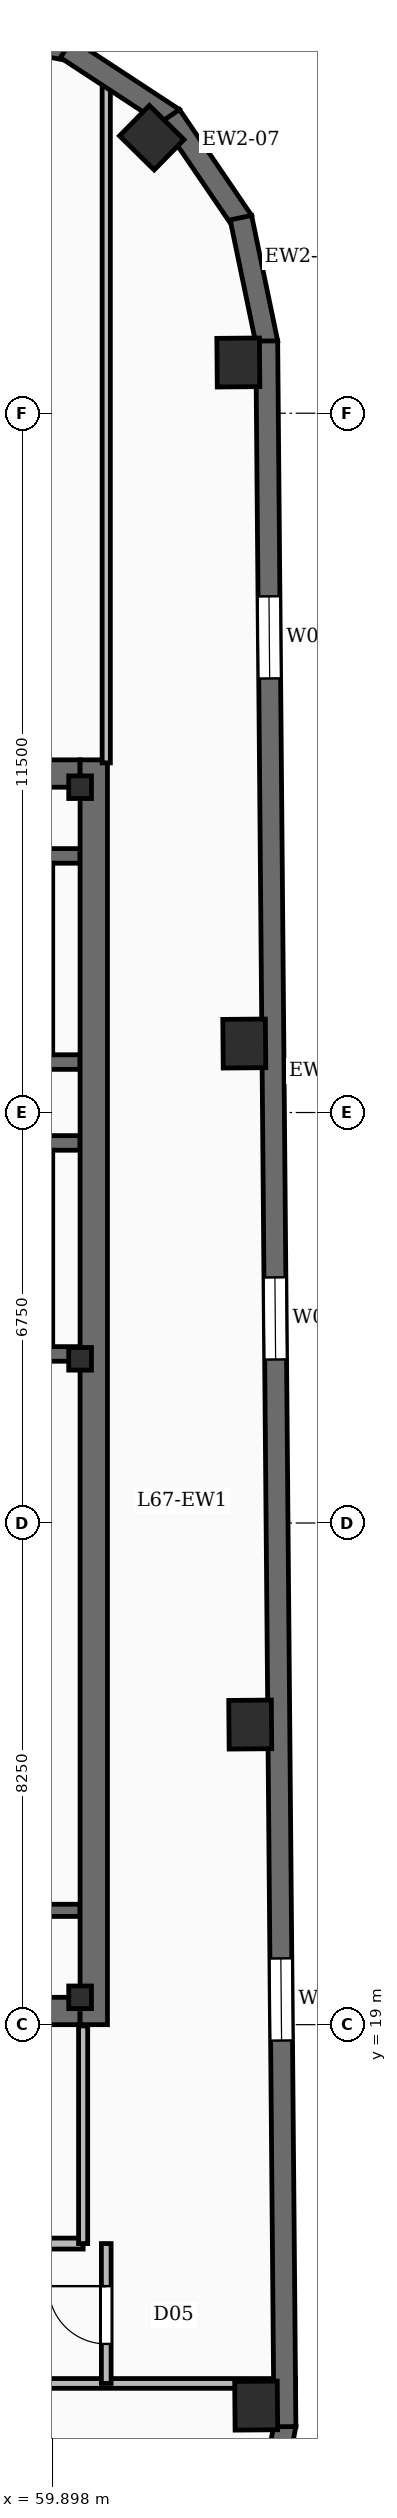
"""IFC4 building model, lengths in metres.
Left out: names, types, materials, properties, quantities, classifications, styles, units other than length and angle.
Written with IfcOpenShell. Run it as: python <this file> out.ifc"""

import sys

from ifc_helpers import new_model, si_unit, direction, frame, frame_2d, origin, origin_2d, place, context, subcontext, project, spatial, rectangle, i_section, extrude, element, fill, save


model = new_model("IFC4")
c1 = context("Model", 3, precision=1e-05, world=origin(), true_north=direction((0.0, 1.0)))
c2 = subcontext(c1, "Body", "Model", "MODEL_VIEW")
j1 = project(units=[si_unit("LENGTHUNIT", "METRE"), si_unit("PLANEANGLEUNIT", "RADIAN")], contexts=[c1])
p1 = place(None, origin())
s1 = spatial("IfcSite", under=j1, at=p1, CompositionType="ELEMENT")
p2 = place(p1, origin())
s2 = spatial("IfcBuilding", under=s1, at=p2, CompositionType="ELEMENT")
p3 = place(p2, frame((0.0, 0.0, 274.9)))
s3 = spatial("IfcBuildingStorey", under=s2, at=p3, CompositionType="ELEMENT", Elevation=274.9)
p4 = place(p3, frame((60.575, 19.0, -0.45), z_axis=(0.0, 0.0, 1.0), x_axis=(0.0, 1.0, 0.0)))
e1 = element("IfcWall", 1, at=p4, inside=s3, PredefinedType="SHEAR", context=c2, shape_type="SweptSolid", body=[
    extrude(rectangle(XDim=20.8, YDim=0.45, at=frame_2d((10.4, 0.0))), origin(), (0.0, 0.0, 1.0), 3.93),
])
for number, where, z_axis, x_axis in (
    (2, (50.55, 19.225, -0.45), (0.0, 0.0, 1.0), (1.0, 0.0, 0.0)),
    (3, (50.55, 39.575, -0.45), (0.0, 0.0, 1.0), (1.0, 0.0, 0.0)),
):
    element("IfcWall", number, at=place(p3, frame(where, z_axis=z_axis, x_axis=x_axis)), inside=s3, PredefinedType="SHEAR", context=c2, shape_type="SweptSolid", body=[
        extrude(rectangle(XDim=9.8, YDim=0.45, at=frame_2d((4.9, 0.0))), origin(), (0.0, 0.0, 1.0), 3.93),
    ])
for number, where, z_axis, x_axis in (
    (4, (60.35, 19.45, -0.45), (0.0, 0.0, 1.0), (1.0, 0.0, 0.0)),
    (5, (60.35, 29.95, -0.45), (0.0, 0.0, 1.0), (1.0, 0.0, 0.0)),
    (6, (60.35, 39.35, -0.45), (0.0, 0.0, 1.0), (1.0, 0.0, 0.0)),
):
    element("IfcColumn", number, at=place(p3, frame(where, z_axis=z_axis, x_axis=x_axis)), inside=s3, PredefinedType="COLUMN", context=c2, shape_type="SweptSolid", body=[
        extrude(i_section(OverallWidth=0.374, OverallDepth=0.372, WebThickness=0.016, FlangeThickness=0.026, FilletRadius=0.02, at=origin_2d()), origin(), (0.0, 0.0, 1.0), 3.93),
    ])
for number, where, z_axis, x_axis in (
    (7, (63.246, 12.735, -0.45), (0.0, 0.0, 1.0), (-0.009, 1.0, 0.0)),
    (8, (63.148, 23.935, -0.45), (0.0, 0.0, 1.0), (-0.009, 1.0, 0.0)),
    (9, (63.05, 35.135, -0.45), (0.0, 0.0, 1.0), (-0.009, 1.0, 0.0)),
    (10, (62.952, 46.334, -0.45), (0.0, 0.0, 1.0), (-0.009, 1.0, 0.0)),
    (11, (61.529, 50.031, -0.45), (0.0, 0.0, 1.0), (-0.713, 0.701, 0.0)),
):
    element("IfcColumn", number, at=place(p3, frame(where, z_axis=z_axis, x_axis=x_axis)), inside=s3, PredefinedType="COLUMN", context=c2, shape_type="SweptSolid", body=[
        extrude(rectangle(XDim=0.8, YDim=0.7, at=origin_2d()), origin(), (0.0, 0.0, 1.0), 3.93),
    ])
p5 = place(p3, frame((63.722, 12.425, 0.0), z_axis=(0.0, 0.0, 1.0), x_axis=(-0.186435855703, -0.98246713518, 0.0)))
e12 = element("IfcWall", 12, at=p5, inside=s3, PredefinedType="SOLIDWALL", context=c2, shape_type="SweptSolid", body=[
    extrude(rectangle(XDim=2.107, YDim=0.36, at=frame_2d((1.053, 0.0))), origin(), (0.0, 0.0, 1.0), 3.48),
])
p6 = place(p3, frame((63.419, 46.688, 0.0), z_axis=(0.0, 0.0, 1.0), x_axis=(0.008726391715, -0.999961924319, 0.0)))
e13 = element("IfcWall", 13, at=p6, inside=s3, PredefinedType="SOLIDWALL", context=c2, shape_type="SweptSolid", body=[
    extrude(rectangle(XDim=34.3, YDim=0.36, at=frame_2d((17.15, 0.0))), origin(), (0.0, 0.0, 1.0), 3.48),
])
p7 = place(p6, frame((4.2, 0.0, 0.88)))
e14 = element("IfcOpeningElement", 14, at=p7, cuts=e13, PredefinedType="OPENING", context=c2, shape_type="SweptSolid", body=[
    extrude(rectangle(XDim=1.35, YDim=2.2, at=frame_2d((0.675, 1.1))), frame((0.0, 0.19, 0.0), z_axis=(0.0, -1.0, 0.0), x_axis=(1.0, 0.0, 0.0)), (0.0, 0.0, 1.0), 0.38),
])
p8 = place(p6, frame((15.4, 0.0, 0.88)))
e15 = element("IfcOpeningElement", 15, at=p8, cuts=e13, PredefinedType="OPENING", context=c2, shape_type="SweptSolid", body=[
    extrude(rectangle(XDim=1.35, YDim=2.2, at=frame_2d((0.675, 1.1))), frame((0.0, 0.19, 0.0), z_axis=(0.0, -1.0, 0.0), x_axis=(1.0, 0.0, 0.0)), (0.0, 0.0, 1.0), 0.38),
])
p9 = place(p6, frame((26.6, 0.0, 0.88)))
e16 = element("IfcOpeningElement", 16, at=p9, cuts=e13, PredefinedType="OPENING", context=c2, shape_type="SweptSolid", body=[
    extrude(rectangle(XDim=1.35, YDim=2.2, at=frame_2d((0.675, 1.1))), frame((0.0, 0.19, 0.0), z_axis=(0.0, -1.0, 0.0), x_axis=(1.0, 0.0, 0.0)), (0.0, 0.0, 1.0), 0.38),
])
for number, where, z_axis, x_axis in (
    (17, (62.994, 48.716, 0.0), (0.0, 0.0, 1.0), (0.204, -0.979, 0.0)),
    (18, (61.836, 50.393, 0.0), (0.0, 0.0, 1.0), (0.563, -0.827, 0.0)),
):
    element("IfcWall", number, at=place(p3, frame(where, z_axis=z_axis, x_axis=x_axis)), inside=s3, PredefinedType="SOLIDWALL", context=c2, shape_type="SweptSolid", body=[
        extrude(rectangle(XDim=2.107, YDim=0.36, at=frame_2d((1.053, 0.0))), origin(), (0.0, 0.0, 1.0), 3.48),
    ])
for number, where, z_axis, x_axis in (
    (19, (60.124, 51.499, 0.0), (0.0, 0.0, 1.0), (0.836, -0.548, 0.0)),
    (20, (58.119, 51.865, 0.0), (0.0, 0.0, 1.0), (0.982, -0.186, 0.0)),
):
    element("IfcWall", number, at=place(p3, frame(where, z_axis=z_axis, x_axis=x_axis)), inside=s3, PredefinedType="SOLIDWALL", context=c2, shape_type="SweptSolid", body=[
        extrude(rectangle(XDim=2.107, YDim=0.36, at=frame_2d((1.053, 0.0))), origin(), (0.0, 0.0, 1.0), 3.48),
    ])
p10 = place(p3, frame((60.35, 30.03, 0.0), z_axis=(0.0, 0.0, 1.0), x_axis=(-1.0, 0.0, 0.0)))
e21 = element("IfcWall", 21, at=p10, inside=s3, PredefinedType="SOLIDWALL", context=c2, shape_type="SweptSolid", body=[
    extrude(rectangle(XDim=9.8, YDim=0.24, at=frame_2d((4.9, 0.0))), origin(), (0.0, 0.0, 1.0), 3.48),
])
p11 = place(p10, frame((7.83, 0.0, 0.0)))
e22 = element("IfcOpeningElement", 22, at=p11, cuts=e21, PredefinedType="OPENING", context=c2, shape_type="SweptSolid", body=[
    extrude(rectangle(XDim=1.1, YDim=2.15, at=frame_2d((0.55, 1.075))), frame((0.0, 0.13, 0.0), z_axis=(0.0, -1.0, 0.0), x_axis=(1.0, 0.0, 0.0)), (0.0, 0.0, 1.0), 0.26),
])
p12 = place(p3, frame((50.55, 33.5, 0.0), z_axis=(0.0, 0.0, 1.0), x_axis=(1.0, 0.0, 0.0)))
e23 = element("IfcWall", 23, at=p12, inside=s3, PredefinedType="SOLIDWALL", context=c2, shape_type="SweptSolid", body=[
    extrude(rectangle(XDim=9.8, YDim=0.24, at=frame_2d((4.9, 0.0))), origin(), (0.0, 0.0, 1.0), 3.48),
])
p13 = place(p3, frame((59.78, 30.15, 0.0), z_axis=(0.0, 0.0, 1.0), x_axis=(0.0, 1.0, 0.0)))
e24 = element("IfcWall", 24, at=p13, inside=s3, PredefinedType="SOLIDWALL", context=c2, shape_type="SweptSolid", body=[
    extrude(rectangle(XDim=3.23, YDim=0.24, at=frame_2d((1.615, 0.0))), origin(), (0.0, 0.0, 1.0), 3.48),
])
p14 = place(p3, frame((60.35, 34.83, 0.0), z_axis=(0.0, 0.0, 1.0), x_axis=(-1.0, 0.0, 0.0)))
e25 = element("IfcWall", 25, at=p14, inside=s3, PredefinedType="SOLIDWALL", context=c2, shape_type="SweptSolid", body=[
    extrude(rectangle(XDim=9.8, YDim=0.24, at=frame_2d((4.9, 0.0))), origin(), (0.0, 0.0, 1.0), 3.48),
])
p15 = place(p14, frame((7.87, 0.0, 0.0)))
e26 = element("IfcOpeningElement", 26, at=p15, cuts=e25, PredefinedType="OPENING", context=c2, shape_type="SweptSolid", body=[
    extrude(rectangle(XDim=1.1, YDim=2.15, at=frame_2d((0.55, 1.075))), frame((0.0, 0.13, 0.0), z_axis=(0.0, -1.0, 0.0), x_axis=(1.0, 0.0, 0.0)), (0.0, 0.0, 1.0), 0.26),
])
p16 = place(p3, frame((50.55, 38.22, 0.0), z_axis=(0.0, 0.0, 1.0), x_axis=(1.0, 0.0, 0.0)))
e27 = element("IfcWall", 27, at=p16, inside=s3, PredefinedType="SOLIDWALL", context=c2, shape_type="SweptSolid", body=[
    extrude(rectangle(XDim=9.8, YDim=0.24, at=frame_2d((4.9, 0.0))), origin(), (0.0, 0.0, 1.0), 3.48),
])
p17 = place(p3, frame((59.78, 34.95, 0.0), z_axis=(0.0, 0.0, 1.0), x_axis=(0.0, 1.0, 0.0)))
e28 = element("IfcWall", 28, at=p17, inside=s3, PredefinedType="SOLIDWALL", context=c2, shape_type="SweptSolid", body=[
    extrude(rectangle(XDim=3.15, YDim=0.24, at=frame_2d((1.575, 0.0))), origin(), (0.0, 0.0, 1.0), 3.48),
])
p18 = place(p3, frame((50.55, 20.88, 0.0), z_axis=(0.0, 0.0, 1.0), x_axis=(1.0, 0.0, 0.0)))
e29 = element("IfcWall", 29, at=p18, inside=s3, PredefinedType="SOLIDWALL", context=c2, shape_type="SweptSolid", body=[
    extrude(rectangle(XDim=9.8, YDim=0.2, at=frame_2d((4.9, 0.0))), origin(), (0.0, 0.0, 1.0), 2.54),
])
p19 = place(p18, frame((1.4, 0.0, 0.0)))
e30 = element("IfcOpeningElement", 30, at=p19, cuts=e29, PredefinedType="OPENING", context=c2, shape_type="SweptSolid", body=[
    extrude(rectangle(XDim=1.05, YDim=2.15, at=frame_2d((0.525, 1.075))), frame((0.0, 0.11, 0.0), z_axis=(0.0, -1.0, 0.0), x_axis=(1.0, 0.0, 0.0)), (0.0, 0.0, 1.0), 0.22),
])
p20 = place(p18, frame((5.5, 0.0, 0.0)))
e31 = element("IfcOpeningElement", 31, at=p20, cuts=e29, PredefinedType="OPENING", context=c2, shape_type="SweptSolid", body=[
    extrude(rectangle(XDim=1.05, YDim=2.15, at=frame_2d((0.525, 1.075))), frame((0.0, 0.11, 0.0), z_axis=(0.0, -1.0, 0.0), x_axis=(1.0, 0.0, 0.0)), (0.0, 0.0, 1.0), 0.22),
])
p21 = place(p3, frame((50.4, 15.4, 0.0), z_axis=(0.0, 0.0, 1.0), x_axis=(1.0, 0.0, 0.0)))
e32 = element("IfcWall", 32, at=p21, inside=s3, PredefinedType="SOLIDWALL", context=c2, shape_type="SweptSolid", body=[
    extrude(rectangle(XDim=10.0, YDim=0.18, at=frame_2d((5.0, 0.0))), origin(), (0.0, 0.0, 1.0), 2.54),
])
p22 = place(p21, frame((1.19, 0.0, 0.0)))
e33 = element("IfcOpeningElement", 33, at=p22, cuts=e32, PredefinedType="OPENING", context=c2, shape_type="SweptSolid", body=[
    extrude(rectangle(XDim=0.92, YDim=2.1, at=frame_2d((0.46, 1.05))), frame((0.0, 0.1, 0.0), z_axis=(0.0, -1.0, 0.0), x_axis=(1.0, 0.0, 0.0)), (0.0, 0.0, 1.0), 0.2),
])
p23 = place(p21, frame((4.54, 0.0, 0.0)))
e34 = element("IfcOpeningElement", 34, at=p23, cuts=e32, PredefinedType="OPENING", context=c2, shape_type="SweptSolid", body=[
    extrude(rectangle(XDim=0.92, YDim=2.1, at=frame_2d((0.46, 1.05))), frame((0.0, 0.1, 0.0), z_axis=(0.0, -1.0, 0.0), x_axis=(1.0, 0.0, 0.0)), (0.0, 0.0, 1.0), 0.2),
])
p24 = place(p21, frame((7.92, 0.0, 0.0)))
e35 = element("IfcOpeningElement", 35, at=p24, cuts=e32, PredefinedType="OPENING", context=c2, shape_type="SweptSolid", body=[
    extrude(rectangle(XDim=0.86, YDim=2.05, at=frame_2d((0.43, 1.025))), frame((0.0, 0.1, 0.0), z_axis=(0.0, -1.0, 0.0), x_axis=(1.0, 0.0, 0.0)), (0.0, 0.0, 1.0), 0.2),
])
p25 = place(p3, frame((60.4, 15.4, 0.0), z_axis=(0.0, 0.0, 1.0), x_axis=(0.0, 1.0, 0.0)))
e36 = element("IfcWall", 36, at=p25, inside=s3, PredefinedType="PARTITIONING", context=c2, shape_type="SweptSolid", body=[
    extrude(rectangle(XDim=3.58, YDim=0.15, at=frame_2d((1.79, 0.0))), origin(), (0.0, 0.0, 1.0), 2.54),
])
p26 = place(p3, frame((8.79, 13.1, 0.0), z_axis=(0.0, 0.0, 1.0), x_axis=(1.0, 0.0, 0.0)))
e37 = element("IfcWall", 37, at=p26, inside=s3, PredefinedType="PARTITIONING", context=c2, shape_type="SweptSolid", body=[
    extrude(rectangle(XDim=55.102, YDim=0.16, at=frame_2d((27.551, 0.0))), origin(), (0.0, 0.0, 1.0), 2.54),
])
p27 = place(p26, frame((11.435, 0.0, 0.0)))
e38 = element("IfcOpeningElement", 38, at=p27, cuts=e37, PredefinedType="OPENING", context=c2, shape_type="SweptSolid", body=[
    extrude(rectangle(XDim=0.95, YDim=2.15, at=frame_2d((0.475, 1.075))), frame((0.0, 0.09, 0.0), z_axis=(0.0, -1.0, 0.0), x_axis=(1.0, 0.0, 0.0)), (0.0, 0.0, 1.0), 0.18),
])
p28 = place(p26, frame((19.885, 0.0, 0.0)))
e39 = element("IfcOpeningElement", 39, at=p28, cuts=e37, PredefinedType="OPENING", context=c2, shape_type="SweptSolid", body=[
    extrude(rectangle(XDim=0.95, YDim=2.15, at=frame_2d((0.475, 1.075))), frame((0.0, 0.09, 0.0), z_axis=(0.0, -1.0, 0.0), x_axis=(1.0, 0.0, 0.0)), (0.0, 0.0, 1.0), 0.18),
])
p29 = place(p26, frame((30.735, 0.0, 0.0)))
e40 = element("IfcOpeningElement", 40, at=p29, cuts=e37, PredefinedType="OPENING", context=c2, shape_type="SweptSolid", body=[
    extrude(rectangle(XDim=0.95, YDim=2.15, at=frame_2d((0.475, 1.075))), frame((0.0, 0.09, 0.0), z_axis=(0.0, -1.0, 0.0), x_axis=(1.0, 0.0, 0.0)), (0.0, 0.0, 1.0), 0.18),
])
p30 = place(p26, frame((39.485, 0.0, 0.0)))
e41 = element("IfcOpeningElement", 41, at=p30, cuts=e37, PredefinedType="OPENING", context=c2, shape_type="SweptSolid", body=[
    extrude(rectangle(XDim=0.95, YDim=2.15, at=frame_2d((0.475, 1.075))), frame((0.0, 0.09, 0.0), z_axis=(0.0, -1.0, 0.0), x_axis=(1.0, 0.0, 0.0)), (0.0, 0.0, 1.0), 0.18),
])
p31 = place(p26, frame((47.235, 0.0, 0.0)))
e42 = element("IfcOpeningElement", 42, at=p31, cuts=e37, PredefinedType="OPENING", context=c2, shape_type="SweptSolid", body=[
    extrude(rectangle(XDim=0.95, YDim=2.15, at=frame_2d((0.475, 1.075))), frame((0.0, 0.09, 0.0), z_axis=(0.0, -1.0, 0.0), x_axis=(1.0, 0.0, 0.0)), (0.0, 0.0, 1.0), 0.18),
])
p32 = place(p3, frame((60.78, 39.75, 0.0), z_axis=(0.0, 0.0, 1.0), x_axis=(0.0, 1.0, 0.0)))
e43 = element("IfcWall", 43, at=p32, inside=s3, PredefinedType="PARTITIONING", context=c2, shape_type="SweptSolid", body=[
    extrude(rectangle(XDim=11.247, YDim=0.135, at=frame_2d((5.624, 0.0))), origin(), (0.0, 0.0, 1.0), 2.54),
])
p33 = place(p3, frame((60.78, 13.1, 0.0), z_axis=(0.0, 0.0, 1.0), x_axis=(0.0, 1.0, 0.0)))
e44 = element("IfcWall", 44, at=p33, inside=s3, PredefinedType="PARTITIONING", context=c2, shape_type="SweptSolid", body=[
    extrude(rectangle(XDim=2.3, YDim=0.16, at=frame_2d((1.15, 0.0))), origin(), (0.0, 0.0, 1.0), 2.54),
])
p34 = place(p33, frame((0.65, 0.0, 0.0)))
e45 = element("IfcOpeningElement", 45, at=p34, cuts=e44, PredefinedType="OPENING", context=c2, shape_type="SweptSolid", body=[
    extrude(rectangle(XDim=0.95, YDim=2.15, at=frame_2d((0.475, 1.075))), frame((0.0, 0.09, 0.0), z_axis=(0.0, -1.0, 0.0), x_axis=(1.0, 0.0, 0.0)), (0.0, 0.0, 1.0), 0.18),
])
p35 = place(p7, origin())
e46 = element("IfcWindow", 46, at=p35, inside=s3, PartitioningType="SINGLE_PANEL", PredefinedType="WINDOW", context=c2, shape_type="SweptSolid", body=[
    extrude(rectangle(XDim=1.35, YDim=2.2, at=frame_2d((0.675, 1.1))), frame((0.0, 0.03, 0.0), z_axis=(0.0, -1.0, 0.0), x_axis=(1.0, 0.0, 0.0)), (0.0, 0.0, 1.0), 0.06),
])
fill(e14, e46)
p36 = place(p8, origin())
e47 = element("IfcWindow", 47, at=p36, inside=s3, PartitioningType="SINGLE_PANEL", PredefinedType="WINDOW", context=c2, shape_type="SweptSolid", body=[
    extrude(rectangle(XDim=1.35, YDim=2.2, at=frame_2d((0.675, 1.1))), frame((0.0, 0.03, 0.0), z_axis=(0.0, -1.0, 0.0), x_axis=(1.0, 0.0, 0.0)), (0.0, 0.0, 1.0), 0.06),
])
fill(e15, e47)
p37 = place(p9, origin())
e48 = element("IfcWindow", 48, at=p37, inside=s3, PartitioningType="SINGLE_PANEL", PredefinedType="WINDOW", context=c2, shape_type="SweptSolid", body=[
    extrude(rectangle(XDim=1.35, YDim=2.2, at=frame_2d((0.675, 1.1))), frame((0.0, 0.03, 0.0), z_axis=(0.0, -1.0, 0.0), x_axis=(1.0, 0.0, 0.0)), (0.0, 0.0, 1.0), 0.06),
])
fill(e16, e48)
p38 = place(p34, origin())
e49 = element("IfcDoor", 49, at=p38, inside=s3, OperationType="SINGLE_SWING_RIGHT", PredefinedType="DOOR", context=c2, shape_type="SweptSolid", body=[
    extrude(rectangle(XDim=0.95, YDim=2.15, at=frame_2d((0.475, 1.075))), frame((0.0, 0.025, 0.0), z_axis=(0.0, -1.0, 0.0), x_axis=(1.0, 0.0, 0.0)), (0.0, 0.0, 1.0), 0.05),
])
fill(e45, e49)
save(model, sys.argv[1])
